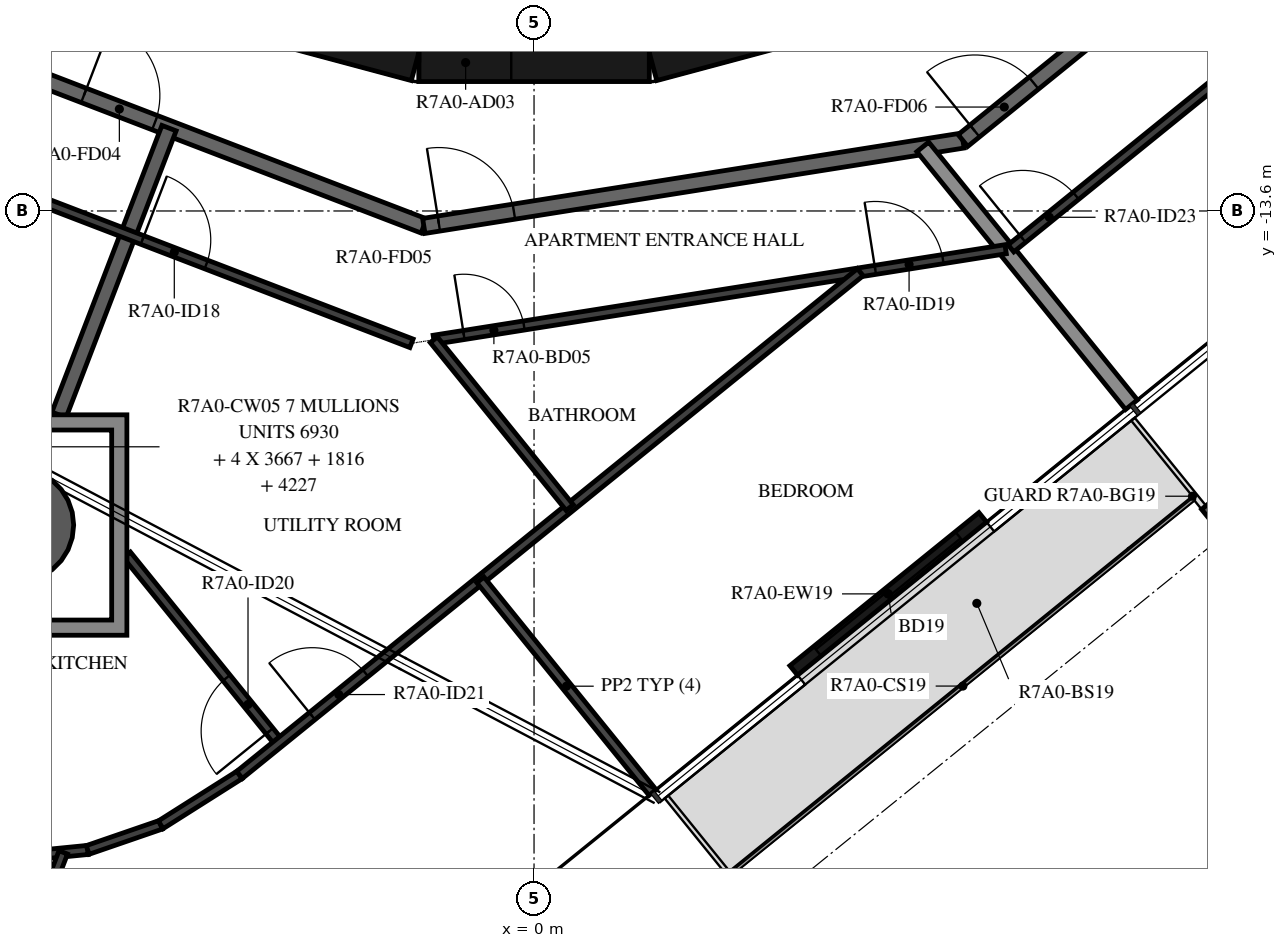
"""IFC4 building model, lengths in metres.
Left out: names, types, materials, properties, quantities, classifications, styles, units other than length and angle.
Written with IfcOpenShell. Run it as: python <this file> out.ifc"""

import sys

from ifc_helpers import new_model, si_unit, direction, frame, frame_2d, origin, origin_2d, place, context, subcontext, project, spatial, polyline, rectangle, hollow_circle, i_section, outline, extrude, element, fill, save


model = new_model("IFC4")
c1 = context("Model", 3, precision=1e-05, world=origin(), true_north=direction((0.0, 1.0)))
c2 = subcontext(c1, "Body", "Model", "MODEL_VIEW")
j1 = project(units=[si_unit("LENGTHUNIT", "METRE"), si_unit("PLANEANGLEUNIT", "RADIAN")], contexts=[c1])
p1 = place(None, origin())
s1 = spatial("IfcSite", under=j1, at=p1, CompositionType="ELEMENT")
p2 = place(p1, origin())
s2 = spatial("IfcBuilding", under=s1, at=p2, CompositionType="ELEMENT")
p3 = place(p2, frame((0.0, 0.0, 270.4)))
s3 = spatial("IfcBuildingStorey", under=s2, at=p3, CompositionType="ELEMENT", Elevation=270.4)
p4 = place(p3, frame((-6.807, -17.732, -0.38), z_axis=(0.0, 0.0, 1.0), x_axis=(1.0, 0.0, 0.0)))
e1 = element("IfcColumn", 1, at=p4, inside=s3, PredefinedType="COLUMN", context=c2, shape_type="SweptSolid", body=[
    extrude(hollow_circle(Radius=0.75, WallThickness=0.035, at=origin_2d()), origin(), (0.0, 0.0, 1.0), 3.5),
])
p5 = place(p3, frame((9.182, -17.781, -0.38), z_axis=(0.0, 0.0, 1.0), x_axis=(-0.777146167973, -0.629320136024, 0.0)))
e2 = element("IfcColumn", 2, at=p5, inside=s3, PredefinedType="COLUMN", context=c2, shape_type="SweptSolid", body=[
    extrude(i_section(OverallWidth=0.3, OverallDepth=0.9, WebThickness=0.019, FlangeThickness=0.035, FilletRadius=0.03, at=origin_2d()), origin(), (0.0, 0.0, 1.0), 3.5),
])
p6 = place(p3, frame((3.417, -19.645, 0.0), z_axis=(0.0, 0.0, 1.0), x_axis=(0.777125818, 0.629345265333, 0.0)))
e3 = element("IfcWall", 3, at=p6, inside=s3, PredefinedType="STANDARD", context=c2, shape_type="SweptSolid", body=[
    extrude(rectangle(XDim=3.2, YDim=0.16, at=frame_2d((1.6, 0.0))), origin(), (0.0, 0.0, 1.0), 3.12),
])
p7 = place(p6, frame((0.4, 0.0, 0.0)))
e4 = element("IfcOpeningElement", 4, at=p7, cuts=e3, PredefinedType="OPENING", context=c2, shape_type="SweptSolid", body=[
    extrude(rectangle(XDim=2.4, YDim=2.4, at=frame_2d((1.2, 1.2))), frame((0.0, 0.09, 0.0), z_axis=(0.0, -1.0, 0.0), x_axis=(1.0, 0.0, 0.0)), (0.0, 0.0, 1.0), 0.18),
])
for number, where, z_axis, x_axis in (
    (5, (1.55, -11.643, 0.0), (0.0, 0.0, 1.0), (0.966, 0.259, 0.0)),
    (6, (-4.479, -10.858, 0.0), (0.0, 0.0, 1.0), (0.966, -0.259, 0.0)),
):
    element("IfcWall", number, at=place(p3, frame(where, z_axis=z_axis, x_axis=x_axis)), inside=s3, PredefinedType="SHEAR", context=c2, shape_type="SweptSolid", body=[
        extrude(rectangle(XDim=3.033, YDim=0.5, at=frame_2d((1.516, 0.0))), origin(), (0.0, 0.0, 1.0), 3.12),
    ])
p8 = place(p3, frame((-1.516, -11.647, 0.0), z_axis=(0.0, 0.0, 1.0), x_axis=(1.0, 0.0, 0.0)))
e7 = element("IfcWall", 7, at=p8, inside=s3, PredefinedType="SHEAR", context=c2, shape_type="SweptSolid", body=[
    extrude(rectangle(XDim=3.033, YDim=0.5, at=frame_2d((1.516, 0.0))), origin(), (0.0, 0.0, 1.0), 3.12),
])
p9 = place(p8, frame((0.016, 0.0, 0.0)))
e8 = element("IfcOpeningElement", 8, at=p9, cuts=e7, PredefinedType="OPENING", context=c2, shape_type="SweptSolid", body=[
    extrude(rectangle(XDim=1.2, YDim=2.1, at=frame_2d((0.6, 1.05))), frame((0.0, 0.26, 0.0), z_axis=(0.0, -1.0, 0.0), x_axis=(1.0, 0.0, 0.0)), (0.0, 0.0, 1.0), 0.52),
])
p10 = place(p3, frame((-8.154, -11.223, 0.0), z_axis=(0.0, 0.0, 1.0), x_axis=(0.93359073609, -0.358341090983, 0.0)))
e9 = element("IfcWall", 9, at=p10, inside=s3, PredefinedType="STANDARD", context=c2, shape_type="SweptSolid", body=[
    extrude(rectangle(XDim=7.181, YDim=0.2, at=frame_2d((3.59, 0.0))), origin(), (0.0, 0.0, 1.0), 3.12),
])
p11 = place(p10, frame((2.39, 0.0, 0.0)))
e10 = element("IfcOpeningElement", 10, at=p11, cuts=e9, PredefinedType="OPENING", context=c2, shape_type="SweptSolid", body=[
    extrude(rectangle(XDim=1.0, YDim=2.1, at=frame_2d((0.5, 1.05))), frame((0.0, 0.11, 0.0), z_axis=(0.0, -1.0, 0.0), x_axis=(1.0, 0.0, 0.0)), (0.0, 0.0, 1.0), 0.22),
])
p12 = place(p3, frame((-1.45, -13.797, 0.0), z_axis=(0.0, 0.0, 1.0), x_axis=(0.987690361611, 0.156421704315, 0.0)))
e11 = element("IfcWall", 11, at=p12, inside=s3, PredefinedType="STANDARD", context=c2, shape_type="SweptSolid", body=[
    extrude(rectangle(XDim=7.181, YDim=0.2, at=frame_2d((3.591, 0.0))), origin(), (0.0, 0.0, 1.0), 3.12),
])
p13 = place(p12, frame((0.2, 0.0, 0.0)))
e12 = element("IfcOpeningElement", 12, at=p13, cuts=e11, PredefinedType="OPENING", context=c2, shape_type="SweptSolid", body=[
    extrude(rectangle(XDim=1.0, YDim=2.1, at=frame_2d((0.5, 1.05))), frame((0.0, 0.11, 0.0), z_axis=(0.0, -1.0, 0.0), x_axis=(1.0, 0.0, 0.0)), (0.0, 0.0, 1.0), 0.22),
])
p14 = place(p3, frame((5.643, -12.673, 0.0), z_axis=(0.0, 0.0, 1.0), x_axis=(0.777160148113, 0.629302871585, 0.0)))
e13 = element("IfcWall", 13, at=p14, inside=s3, PredefinedType="STANDARD", context=c2, shape_type="SweptSolid", body=[
    extrude(rectangle(XDim=7.181, YDim=0.2, at=frame_2d((3.59, 0.0))), origin(), (0.0, 0.0, 1.0), 3.12),
])
p15 = place(p14, frame((0.2, 0.0, 0.0)))
e14 = element("IfcOpeningElement", 14, at=p15, cuts=e13, PredefinedType="OPENING", context=c2, shape_type="SweptSolid", body=[
    extrude(rectangle(XDim=1.0, YDim=2.1, at=frame_2d((0.5, 1.05))), frame((0.0, 0.11, 0.0), z_axis=(0.0, -1.0, 0.0), x_axis=(1.0, 0.0, 0.0)), (0.0, 0.0, 1.0), 0.22),
])
p16 = place(p3, frame((-6.25, -16.282, 0.0), z_axis=(0.0, 0.0, 1.0), x_axis=(0.358351333512, 0.933586804625, 0.0)))
e15 = element("IfcWall", 15, at=p16, inside=s3, PredefinedType="STANDARD", context=c2, shape_type="SweptSolid", body=[
    extrude(rectangle(XDim=4.04, YDim=0.2, at=frame_2d((2.02, 0.0))), origin(), (0.0, 0.0, 1.0), 3.12),
])
p17 = place(p3, frame((7.861, -16.148, 0.0), z_axis=(0.0, 0.0, 1.0), x_axis=(-0.629330189513, 0.777138026716, 0.0)))
e16 = element("IfcWall", 16, at=p17, inside=s3, PredefinedType="STANDARD", context=c2, shape_type="SweptSolid", body=[
    extrude(rectangle(XDim=4.364, YDim=0.2, at=frame_2d((2.182, 0.0))), origin(), (0.0, 0.0, 1.0), 2.73),
])
p18 = place(p3, frame((-9.067, -12.479, 0.0), z_axis=(0.0, 0.0, 1.0), x_axis=(0.933579449035, -0.358370495911, 0.0)))
e17 = element("IfcWall", 17, at=p18, inside=s3, PredefinedType="PARTITIONING", context=c2, shape_type="SweptSolid", body=[
    extrude(rectangle(XDim=7.985, YDim=0.12, at=frame_2d((3.992, 0.0))), origin(), (0.0, 0.0, 1.0), 3.12),
])
p19 = place(p18, frame((4.192, 0.0, 0.0)))
e18 = element("IfcOpeningElement", 18, at=p19, cuts=e17, PredefinedType="OPENING", context=c2, shape_type="SweptSolid", body=[
    extrude(rectangle(XDim=0.9, YDim=2.1, at=frame_2d((0.45, 1.05))), frame((0.0, 0.07, 0.0), z_axis=(0.0, -1.0, 0.0), x_axis=(1.0, 0.0, 0.0)), (0.0, 0.0, 1.0), 0.14),
])
p20 = place(p3, frame((-1.318, -15.294, 0.0), z_axis=(0.0, 0.0, 1.0), x_axis=(0.987689040792, 0.156430044108, 0.0)))
e19 = element("IfcWall", 19, at=p20, inside=s3, PredefinedType="PARTITIONING", context=c2, shape_type="SweptSolid", body=[
    extrude(rectangle(XDim=7.616, YDim=0.12, at=frame_2d((3.808, 0.0))), origin(), (0.0, 0.0, 1.0), 3.12),
])
p21 = place(p20, frame((0.4, 0.0, 0.0)))
e20 = element("IfcOpeningElement", 20, at=p21, cuts=e19, PredefinedType="OPENING", context=c2, shape_type="SweptSolid", body=[
    extrude(rectangle(XDim=0.8, YDim=2.1, at=frame_2d((0.4, 1.05))), frame((0.0, 0.07, 0.0), z_axis=(0.0, -1.0, 0.0), x_axis=(1.0, 0.0, 0.0)), (0.0, 0.0, 1.0), 0.14),
])
p22 = place(p20, frame((5.88, 0.0, 0.0)))
e21 = element("IfcOpeningElement", 21, at=p22, cuts=e19, PredefinedType="OPENING", context=c2, shape_type="SweptSolid", body=[
    extrude(rectangle(XDim=0.9, YDim=2.1, at=frame_2d((0.45, 1.05))), frame((0.0, 0.07, 0.0), z_axis=(0.0, -1.0, 0.0), x_axis=(1.0, 0.0, 0.0)), (0.0, 0.0, 1.0), 0.14),
])
p23 = place(p3, frame((-5.872, -22.006, 0.0), z_axis=(0.0, 0.0, 1.0), x_axis=(-0.99510832942, -0.09878973995, 0.0)))
e22 = element("IfcWall", 22, at=p23, inside=s3, PredefinedType="PARTITIONING", context=c2, shape_type="SweptSolid", body=[
    extrude(rectangle(XDim=1.016, YDim=0.12, at=frame_2d((0.508, 0.0))), origin(), (0.0, 0.0, 1.0), 3.12),
])
p24 = place(p3, frame((-7.579, -25.646, 0.0), z_axis=(0.0, 0.0, 1.0), x_axis=(0.358314257596, 0.933601035134, 0.0)))
e23 = element("IfcWall", 23, at=p24, inside=s3, PredefinedType="PARTITIONING", context=c2, shape_type="SweptSolid", body=[
    extrude(rectangle(XDim=3.864, YDim=0.12, at=frame_2d((1.932, 0.0))), origin(), (0.0, 0.0, 1.0), 3.12),
])
p25 = place(p24, frame((0.2, 0.0, 0.0)))
e24 = element("IfcOpeningElement", 24, at=p25, cuts=e23, PredefinedType="OPENING", context=c2, shape_type="SweptSolid", body=[
    extrude(rectangle(XDim=0.9, YDim=2.1, at=frame_2d((0.45, 1.05))), frame((0.0, 0.07, 0.0), z_axis=(0.0, -1.0, 0.0), x_axis=(1.0, 0.0, 0.0)), (0.0, 0.0, 1.0), 0.14),
])
p26 = place(p3, frame((-3.354, -20.597, 0.0), z_axis=(0.0, 0.0, 1.0), x_axis=(-0.629352711751, 0.777119787556, 0.0)))
e25 = element("IfcWall", 25, at=p26, inside=s3, PredefinedType="PARTITIONING", context=c2, shape_type="SweptSolid", body=[
    extrude(rectangle(XDim=3.182, YDim=0.12, at=frame_2d((1.591, 0.0))), origin(), (0.0, 0.0, 1.0), 3.12),
])
p27 = place(p26, frame((0.2, 0.0, 0.0)))
e26 = element("IfcOpeningElement", 26, at=p27, cuts=e25, PredefinedType="OPENING", context=c2, shape_type="SweptSolid", body=[
    extrude(rectangle(XDim=0.9, YDim=2.1, at=frame_2d((0.45, 1.05))), frame((0.0, 0.07, 0.0), z_axis=(0.0, -1.0, 0.0), x_axis=(1.0, 0.0, 0.0)), (0.0, 0.0, 1.0), 0.14),
])
p28 = place(p3, frame((-5.872, -22.006, 0.0), z_axis=(0.0, 0.0, 1.0), x_axis=(0.945561838326, 0.325442483247, 0.0)))
e27 = element("IfcWall", 27, at=p28, inside=s3, PredefinedType="PARTITIONING", context=c2, shape_type="SweptSolid", body=[
    extrude(rectangle(XDim=1.016, YDim=0.12, at=frame_2d((0.508, 0.0))), origin(), (0.0, 0.0, 1.0), 3.12),
])
p29 = place(p3, frame((-4.912, -21.676, 0.0), z_axis=(0.0, 0.0, 1.0), x_axis=(0.84494492492, 0.534853319941, 0.0)))
e28 = element("IfcWall", 28, at=p29, inside=s3, PredefinedType="PARTITIONING", context=c2, shape_type="SweptSolid", body=[
    extrude(rectangle(XDim=1.228, YDim=0.12, at=frame_2d((0.614, 0.0))), origin(), (0.0, 0.0, 1.0), 3.12),
])
p30 = place(p3, frame((-3.875, -21.019, 0.0), z_axis=(0.0, 0.0, 1.0), x_axis=(0.777149096542, 0.629316519523, 0.0)))
e29 = element("IfcWall", 29, at=p30, inside=s3, PredefinedType="PARTITIONING", context=c2, shape_type="SweptSolid", body=[
    extrude(rectangle(XDim=10.508, YDim=0.12, at=frame_2d((5.254, 0.0))), origin(), (0.0, 0.0, 1.0), 3.12),
])
p31 = place(p30, frame((1.23, 0.0, 0.0)))
e30 = element("IfcOpeningElement", 30, at=p31, cuts=e29, PredefinedType="OPENING", context=c2, shape_type="SweptSolid", body=[
    extrude(rectangle(XDim=0.9, YDim=2.1, at=frame_2d((0.45, 1.05))), frame((0.0, 0.07, 0.0), z_axis=(0.0, -1.0, 0.0), x_axis=(1.0, 0.0, 0.0)), (0.0, 0.0, 1.0), 0.14),
])
p32 = place(p3, frame((0.469, -17.502, 0.0), z_axis=(0.0, 0.0, 1.0), x_axis=(-0.629307025607, 0.777156784389, 0.0)))
e31 = element("IfcWall", 31, at=p32, inside=s3, PredefinedType="PARTITIONING", context=c2, shape_type="SweptSolid", body=[
    extrude(rectangle(XDim=2.84, YDim=0.12, at=frame_2d((1.42, 0.0))), origin(), (0.0, 0.0, 1.0), 3.12),
])
p33 = place(p3, frame((1.56, -21.251, 0.0), z_axis=(0.0, 0.0, 1.0), x_axis=(-0.62934843781, 0.7771232488, 0.0)))
e32 = element("IfcWall", 32, at=p33, inside=s3, PredefinedType="PARTITIONING", context=c2, shape_type="SweptSolid", body=[
    extrude(rectangle(XDim=3.6, YDim=0.12, at=frame_2d((1.8, 0.0))), origin(), (0.0, 0.0, 1.0), 2.73),
])
p34 = place(p3, frame((6.274, -14.092, 0.0), z_axis=(0.0, 0.0, 1.0), x_axis=(0.777135206268, 0.62933367237, 0.0)))
e33 = element("IfcWall", 33, at=p34, inside=s3, PredefinedType="PARTITIONING", context=c2, shape_type="SweptSolid", body=[
    extrude(rectangle(XDim=7.985, YDim=0.12, at=frame_2d((3.992, 0.0))), origin(), (0.0, 0.0, 1.0), 3.12),
])
p35 = place(p34, frame((0.2, 0.0, 0.0)))
e34 = element("IfcOpeningElement", 34, at=p35, cuts=e33, PredefinedType="OPENING", context=c2, shape_type="SweptSolid", body=[
    extrude(rectangle(XDim=0.9, YDim=2.1, at=frame_2d((0.45, 1.05))), frame((0.0, 0.07, 0.0), z_axis=(0.0, -1.0, 0.0), x_axis=(1.0, 0.0, 0.0)), (0.0, 0.0, 1.0), 0.14),
])
p36 = place(p3, origin())
e35 = element("IfcWall", 35, at=p36, inside=s3, PredefinedType="STANDARD", context=c2, shape_type="SweptSolid", body=[
    extrude(outline(polyline([(-5.357, -16.282), (-5.357, -19.182), (-8.257, -19.182), (-8.257, -16.282), (-5.357, -16.282)]), holes=[polyline([(-8.057, -18.982), (-5.557, -18.982), (-5.557, -16.482), (-8.057, -16.482), (-8.057, -18.982)])]), origin(), (0.0, 0.0, 1.0), 3.12),
])
p37 = place(p7, origin())
e36 = element("IfcDoor", 36, at=p37, inside=s3, OperationType="DOUBLE_DOOR_SLIDING", PredefinedType="DOOR", context=c2, shape_type="SweptSolid", body=[
    extrude(rectangle(XDim=2.4, YDim=2.4, at=frame_2d((1.2, 1.2))), frame((0.0, 0.025, 0.0), z_axis=(0.0, -1.0, 0.0), x_axis=(1.0, 0.0, 0.0)), (0.0, 0.0, 1.0), 0.05),
])
fill(e4, e36)
p38 = place(p9, origin())
e37 = element("IfcDoor", 37, at=p38, inside=s3, OperationType="SINGLE_SWING_RIGHT", PredefinedType="DOOR", context=c2, shape_type="SweptSolid", body=[
    extrude(rectangle(XDim=1.2, YDim=2.1, at=frame_2d((0.6, 1.05))), frame((0.0, 0.025, 0.0), z_axis=(0.0, -1.0, 0.0), x_axis=(1.0, 0.0, 0.0)), (0.0, 0.0, 1.0), 0.05),
])
fill(e8, e37)
p39 = place(p11, origin())
e38 = element("IfcDoor", 38, at=p39, inside=s3, OperationType="SINGLE_SWING_RIGHT", PredefinedType="DOOR", context=c2, shape_type="SweptSolid", body=[
    extrude(rectangle(XDim=1.0, YDim=2.1, at=frame_2d((0.5, 1.05))), frame((0.0, 0.025, 0.0), z_axis=(0.0, -1.0, 0.0), x_axis=(1.0, 0.0, 0.0)), (0.0, 0.0, 1.0), 0.05),
])
fill(e10, e38)
p40 = place(p13, origin())
e39 = element("IfcDoor", 39, at=p40, inside=s3, OperationType="SINGLE_SWING_LEFT", PredefinedType="DOOR", context=c2, shape_type="SweptSolid", body=[
    extrude(rectangle(XDim=1.0, YDim=2.1, at=frame_2d((0.5, 1.05))), frame((0.0, 0.025, 0.0), z_axis=(0.0, -1.0, 0.0), x_axis=(1.0, 0.0, 0.0)), (0.0, 0.0, 1.0), 0.05),
])
fill(e12, e39)
p41 = place(p19, origin())
e40 = element("IfcDoor", 40, at=p41, inside=s3, OperationType="SINGLE_SWING_RIGHT", PredefinedType="DOOR", context=c2, shape_type="SweptSolid", body=[
    extrude(rectangle(XDim=0.9, YDim=2.1, at=frame_2d((0.45, 1.05))), frame((0.0, 0.025, 0.0), z_axis=(0.0, -1.0, 0.0), x_axis=(1.0, 0.0, 0.0)), (0.0, 0.0, 1.0), 0.05),
])
fill(e18, e40)
p42 = place(p21, origin())
e41 = element("IfcDoor", 41, at=p42, inside=s3, OperationType="SINGLE_SWING_LEFT", PredefinedType="DOOR", context=c2, shape_type="SweptSolid", body=[
    extrude(rectangle(XDim=0.8, YDim=2.1, at=frame_2d((0.4, 1.05))), frame((0.0, 0.025, 0.0), z_axis=(0.0, -1.0, 0.0), x_axis=(1.0, 0.0, 0.0)), (0.0, 0.0, 1.0), 0.05),
])
fill(e20, e41)
p43 = place(p22, origin())
e42 = element("IfcDoor", 42, at=p43, inside=s3, OperationType="SINGLE_SWING_LEFT", PredefinedType="DOOR", context=c2, shape_type="SweptSolid", body=[
    extrude(rectangle(XDim=0.9, YDim=2.1, at=frame_2d((0.45, 1.05))), frame((0.0, 0.025, 0.0), z_axis=(0.0, -1.0, 0.0), x_axis=(1.0, 0.0, 0.0)), (0.0, 0.0, 1.0), 0.05),
])
fill(e21, e42)
p44 = place(p27, origin())
e43 = element("IfcDoor", 43, at=p44, inside=s3, OperationType="SINGLE_SWING_LEFT", PredefinedType="DOOR", context=c2, shape_type="SweptSolid", body=[
    extrude(rectangle(XDim=0.9, YDim=2.1, at=frame_2d((0.45, 1.05))), frame((0.0, 0.025, 0.0), z_axis=(0.0, -1.0, 0.0), x_axis=(1.0, 0.0, 0.0)), (0.0, 0.0, 1.0), 0.05),
])
fill(e26, e43)
p45 = place(p31, origin())
e44 = element("IfcDoor", 44, at=p45, inside=s3, OperationType="SINGLE_SWING_LEFT", PredefinedType="DOOR", context=c2, shape_type="SweptSolid", body=[
    extrude(rectangle(XDim=0.9, YDim=2.1, at=frame_2d((0.45, 1.05))), frame((0.0, 0.025, 0.0), z_axis=(0.0, -1.0, 0.0), x_axis=(1.0, 0.0, 0.0)), (0.0, 0.0, 1.0), 0.05),
])
fill(e30, e44)
p46 = place(p15, origin())
e45 = element("IfcDoor", 45, at=p46, inside=s3, OperationType="SINGLE_SWING_LEFT", PredefinedType="DOOR", context=c2, shape_type="SweptSolid", body=[
    extrude(rectangle(XDim=1.0, YDim=2.1, at=frame_2d((0.5, 1.05))), frame((0.0, 0.025, 0.0), z_axis=(0.0, -1.0, 0.0), x_axis=(1.0, 0.0, 0.0)), (0.0, 0.0, 1.0), 0.05),
])
fill(e14, e45)
p47 = place(p35, origin())
e46 = element("IfcDoor", 46, at=p47, inside=s3, OperationType="SINGLE_SWING_LEFT", PredefinedType="DOOR", context=c2, shape_type="SweptSolid", body=[
    extrude(rectangle(XDim=0.9, YDim=2.1, at=frame_2d((0.45, 1.05))), frame((0.0, 0.025, 0.0), z_axis=(0.0, -1.0, 0.0), x_axis=(1.0, 0.0, 0.0)), (0.0, 0.0, 1.0), 0.05),
])
fill(e34, e46)
save(model, sys.argv[1])
